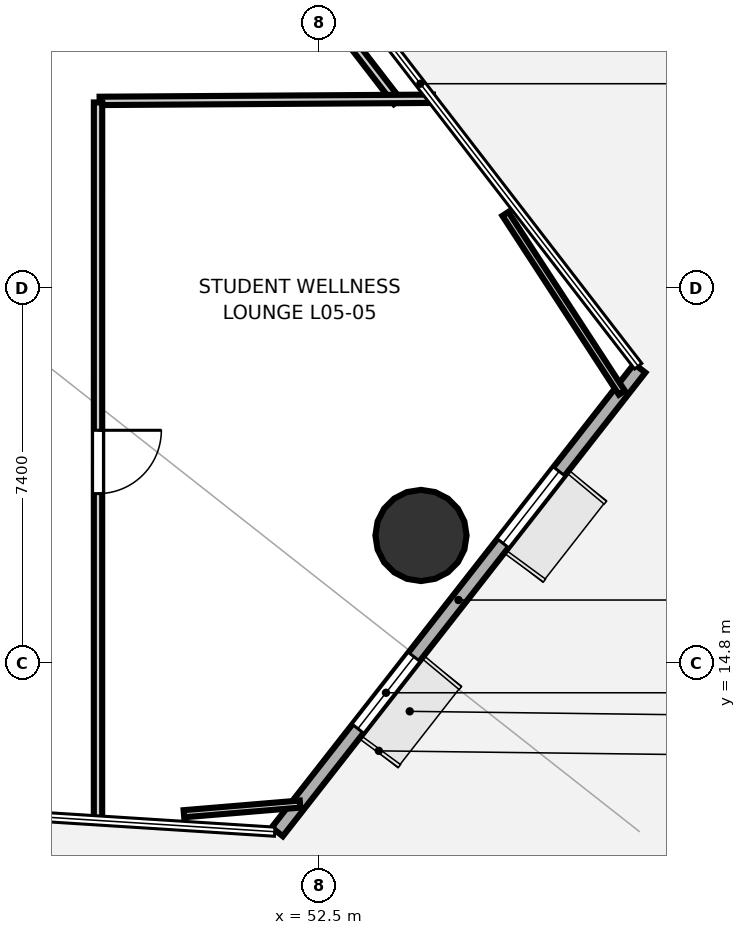
"""IFC4 building model, lengths in metres.
Left out: names, types, materials, properties, quantities, classifications, styles, units other than length and angle.
Written with IfcOpenShell. Run it as: python <this file> out.ifc"""

import sys

from ifc_helpers import new_model, si_unit, direction, frame, frame_2d, origin, origin_2d, place, context, subcontext, project, spatial, rectangle, hollow_circle, extrude, element, fill, save


model = new_model("IFC4")
c1 = context("Model", 3, precision=1e-05, world=origin(), true_north=direction((0.0, 1.0)))
c2 = subcontext(c1, "Body", "Model", "MODEL_VIEW")
j1 = project(units=[si_unit("LENGTHUNIT", "METRE"), si_unit("PLANEANGLEUNIT", "RADIAN")], contexts=[c1])
p1 = place(None, origin())
s1 = spatial("IfcSite", under=j1, at=p1, CompositionType="ELEMENT")
p2 = place(p1, origin())
s2 = spatial("IfcBuilding", under=s1, at=p2, CompositionType="ELEMENT")
p3 = place(p2, frame((0.0, 0.0, 25.7)))
s3 = spatial("IfcBuildingStorey", under=s2, at=p3, CompositionType="ELEMENT", Elevation=25.7)
p4 = place(p3, frame((54.512, 17.317, 0.0), z_axis=(0.0, 0.0, 1.0), x_axis=(1.0, 0.0, 0.0)))
e1 = element("IfcColumn", 1, at=p4, inside=s3, PredefinedType="COLUMN", context=c2, shape_type="SweptSolid", body=[
    extrude(hollow_circle(Radius=0.9, WallThickness=0.045, at=origin_2d()), origin(), (0.0, 0.0, 1.0), 3.7),
])
p5 = place(p3, frame((51.675, 11.468, 0.0), z_axis=(0.0, 0.0, 1.0), x_axis=(0.61597722874, 0.787763958095, 0.0)))
e2 = element("IfcWall", 2, at=p5, inside=s3, PredefinedType="SOLIDWALL", context=c2, shape_type="SweptSolid", body=[
    extrude(rectangle(XDim=11.615, YDim=0.28, at=frame_2d((5.808, 0.0))), origin(), (0.0, 0.0, 1.0), 3.52),
])
p6 = place(p5, frame((2.585, 0.0, 0.85)))
e3 = element("IfcOpeningElement", 3, at=p6, cuts=e2, PredefinedType="OPENING", context=c2, shape_type="SweptSolid", body=[
    extrude(rectangle(XDim=1.8, YDim=2.1, at=frame_2d((0.9, 1.05))), frame((0.0, 0.15, 0.0), z_axis=(0.0, -1.0, 0.0), x_axis=(1.0, 0.0, 0.0)), (0.0, 0.0, 1.0), 0.3),
])
p7 = place(p5, frame((7.231, 0.0, 0.85)))
e4 = element("IfcOpeningElement", 4, at=p7, cuts=e2, PredefinedType="OPENING", context=c2, shape_type="SweptSolid", body=[
    extrude(rectangle(XDim=1.8, YDim=2.1, at=frame_2d((0.9, 1.05))), frame((0.0, 0.15, 0.0), z_axis=(0.0, -1.0, 0.0), x_axis=(1.0, 0.0, 0.0)), (0.0, 0.0, 1.0), 0.3),
])
p8 = place(p3, frame((44.772, 37.897, 0.0), z_axis=(0.0, 0.0, 1.0), x_axis=(0.61079855593, -0.791786034275, 0.0)))
e5 = element("IfcWall", 5, at=p8, inside=s3, PredefinedType="PLUMBINGWALL", context=c2, shape_type="SweptSolid", body=[
    extrude(rectangle(XDim=15.177, YDim=0.165, at=frame_2d((7.588, 0.0))), origin(), (0.0, 0.0, 1.0), 2.798),
])
p9 = place(p3, frame((54.748, 25.935, 0.0), z_axis=(0.0, 0.0, 1.0), x_axis=(-0.999979867578, -0.00634542665, 0.0)))
e6 = element("IfcWall", 6, at=p9, inside=s3, PredefinedType="PLUMBINGWALL", context=c2, shape_type="SweptSolid", body=[
    extrude(rectangle(XDim=6.579, YDim=0.165, at=frame_2d((3.29, 0.0))), origin(), (0.0, 0.0, 1.0), 2.798),
])
p10 = place(p3, frame((48.138, 25.862, 0.0), z_axis=(0.0, 0.0, 1.0), x_axis=(-3.4412746e-05, -0.999999999408, 0.0)))
e7 = element("IfcWall", 7, at=p10, inside=s3, PredefinedType="PLUMBINGWALL", context=c2, shape_type="SweptSolid", body=[
    extrude(rectangle(XDim=14.189, YDim=0.165, at=frame_2d((7.094, 0.0))), origin(), (0.0, 0.0, 1.0), 2.798),
])
p11 = place(p10, frame((6.469, 0.0, 0.0)))
e8 = element("IfcOpeningElement", 8, at=p11, cuts=e7, PredefinedType="OPENING", context=c2, shape_type="SweptSolid", body=[
    extrude(rectangle(XDim=1.25, YDim=2.2, at=frame_2d((0.625, 1.1))), frame((0.0, 0.093, 0.0), z_axis=(0.0, -1.0, 0.0), x_axis=(1.0, 0.0, 0.0)), (0.0, 0.0, 1.0), 0.185),
])
p12 = place(p3, frame((52.125, 12.016, 0.0), z_axis=(0.0, 0.0, 1.0), x_axis=(-0.996566226435, -0.08279949474, 0.0)))
e9 = element("IfcWall", 9, at=p12, inside=s3, PredefinedType="PARTITIONING", context=c2, shape_type="SweptSolid", body=[
    extrude(rectangle(XDim=2.3, YDim=0.14, at=frame_2d((1.15, 0.0))), origin(), (0.0, 0.0, 1.0), 2.84),
])
p13 = place(p3, frame((56.177, 23.663, 0.0), z_axis=(0.0, 0.0, 1.0), x_axis=(0.545664651051, -0.838003632805, 0.0)))
e10 = element("IfcWall", 10, at=p13, inside=s3, PredefinedType="PARTITIONING", context=c2, shape_type="SweptSolid", body=[
    extrude(rectangle(XDim=4.212, YDim=0.14, at=frame_2d((2.106, 0.0))), origin(), (0.0, 0.0, 1.0), 2.84),
])
p14 = place(p11, origin())
e11 = element("IfcDoor", 11, at=p14, inside=s3, OperationType="SINGLE_SWING_LEFT", PredefinedType="DOOR", context=c2, shape_type="SweptSolid", body=[
    extrude(rectangle(XDim=1.25, YDim=2.2, at=frame_2d((0.625, 1.1))), frame((0.0, 0.025, 0.0), z_axis=(0.0, -1.0, 0.0), x_axis=(1.0, 0.0, 0.0)), (0.0, 0.0, 1.0), 0.05),
])
fill(e8, e11)
p15 = place(p6, origin())
e12 = element("IfcWindow", 12, at=p15, inside=s3, PartitioningType="SINGLE_PANEL", PredefinedType="WINDOW", context=c2, shape_type="SweptSolid", body=[
    extrude(rectangle(XDim=1.8, YDim=2.1, at=frame_2d((0.9, 1.05))), frame((0.0, 0.03, 0.0), z_axis=(0.0, -1.0, 0.0), x_axis=(1.0, 0.0, 0.0)), (0.0, 0.0, 1.0), 0.06),
])
fill(e3, e12)
p16 = place(p7, origin())
e13 = element("IfcWindow", 13, at=p16, inside=s3, PartitioningType="SINGLE_PANEL", PredefinedType="WINDOW", context=c2, shape_type="SweptSolid", body=[
    extrude(rectangle(XDim=1.8, YDim=2.1, at=frame_2d((0.9, 1.05))), frame((0.0, 0.03, 0.0), z_axis=(0.0, -1.0, 0.0), x_axis=(1.0, 0.0, 0.0)), (0.0, 0.0, 1.0), 0.06),
])
fill(e4, e13)
save(model, sys.argv[1])
